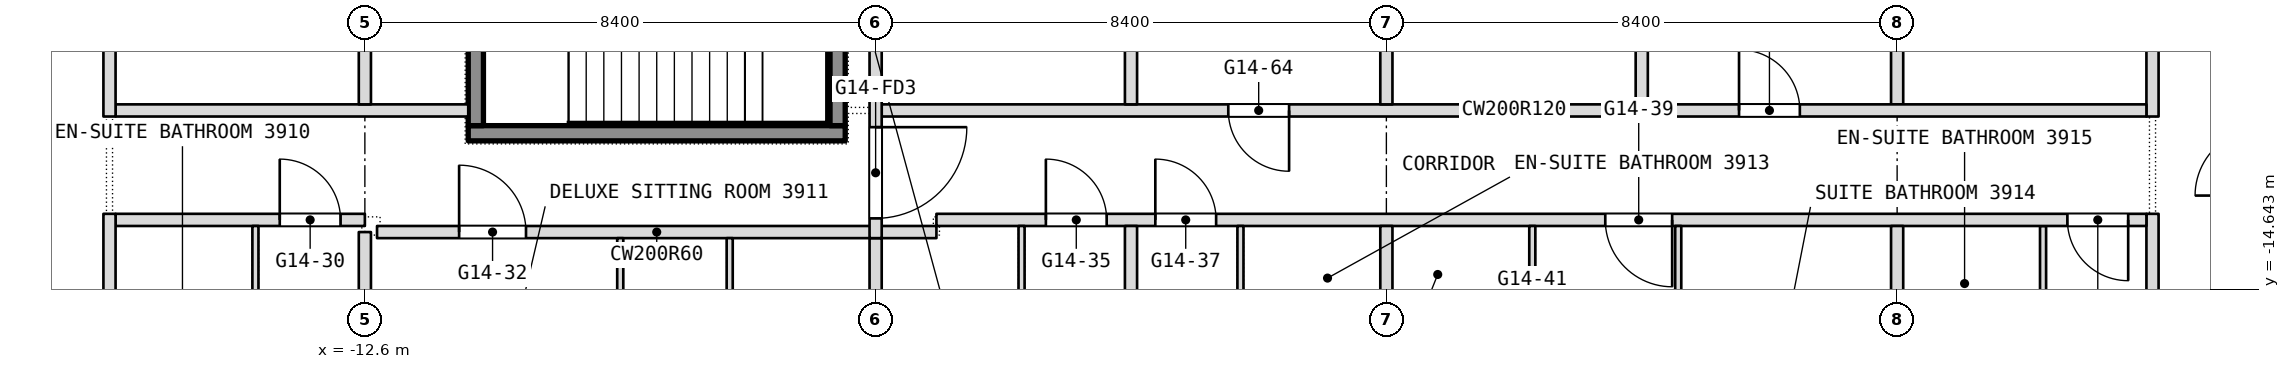
"""IFC4 building model, lengths in metres.
Left out: names, types, materials, properties, quantities, classifications, styles, units other than length and angle.
Written with IfcOpenShell. Run it as: python <this file> out.ifc"""

import sys

from ifc_helpers import new_model, si_unit, direction, frame, frame_2d, origin, place, context, subcontext, project, spatial, rectangle, extrude, element, fill, save


model = new_model("IFC4")
c1 = context("Model", 3, precision=1e-05, world=origin(), true_north=direction((0.0, 1.0)))
c2 = subcontext(c1, "Body", "Model", "MODEL_VIEW")
j1 = project(units=[si_unit("LENGTHUNIT", "METRE"), si_unit("PLANEANGLEUNIT", "RADIAN")], contexts=[c1])
p1 = place(None, origin())
s1 = spatial("IfcSite", under=j1, at=p1, CompositionType="ELEMENT")
p2 = place(p1, origin())
s2 = spatial("IfcBuilding", under=s1, at=p2, CompositionType="ELEMENT")
p3 = place(p2, frame((0.0, 0.0, 166.1)))
s3 = spatial("IfcBuildingStorey", under=s2, at=p3, CompositionType="ELEMENT", Elevation=166.1)
p4 = place(p3, frame((16.8, -22.186, 0.0), z_axis=(0.0, 0.0, 1.0), x_axis=(0.0, 1.0, 0.0)))
e1 = element("IfcWall", 1, at=p4, inside=s3, PredefinedType="PARTITIONING", context=c2, shape_type="SweptSolid", body=[
    extrude(rectangle(XDim=8.786, YDim=0.2, at=frame_2d((4.393, 0.0))), origin(), (0.0, 0.0, 1.0), 3.3),
])
p5 = place(p3, frame((16.8, -11.8, 0.0), z_axis=(0.0, 0.0, 1.0), x_axis=(0.0, 1.0, 0.0)))
e2 = element("IfcWall", 2, at=p5, inside=s3, PredefinedType="PARTITIONING", context=c2, shape_type="SweptSolid", body=[
    extrude(rectangle(XDim=9.9, YDim=0.2, at=frame_2d((4.95, 0.0))), origin(), (0.0, 0.0, 1.0), 3.3),
])
p6 = place(p3, frame((15.0, -16.45, 0.0), z_axis=(0.0, 0.0, 1.0), x_axis=(0.0, 1.0, 0.0)))
e3 = element("IfcWall", 3, at=p6, inside=s3, PredefinedType="PARTITIONING", context=c2, shape_type="SweptSolid", body=[
    extrude(rectangle(XDim=2.85, YDim=0.1, at=frame_2d((1.425, 0.0))), origin(), (0.0, 0.0, 1.0), 3.3),
])
p7 = place(p3, frame((-12.4, -13.7, 0.0), z_axis=(0.0, 0.0, 1.0), x_axis=(1.0, 0.0, 0.0)))
e4 = element("IfcWall", 4, at=p7, inside=s3, PredefinedType="PARTITIONING", context=c2, shape_type="SweptSolid", body=[
    extrude(rectangle(XDim=9.2, YDim=0.2, at=frame_2d((4.6, 0.0))), origin(), (0.0, 0.0, 1.0), 3.3),
])
p8 = place(p7, frame((1.35, 0.0, 0.0)))
e5 = element("IfcOpeningElement", 5, at=p8, cuts=e4, PredefinedType="OPENING", context=c2, shape_type="SweptSolid", body=[
    extrude(rectangle(XDim=1.1, YDim=2.1, at=frame_2d((0.55, 1.05))), frame((0.0, 0.1, 0.0), z_axis=(0.0, -1.0, 0.0), x_axis=(1.0, 0.0, 0.0)), (0.0, 0.0, 1.0), 0.2),
])
p9 = place(p3, frame((-16.7, -13.5, 0.0), z_axis=(0.0, 0.0, 1.0), x_axis=(1.0, 0.0, 0.0)))
e6 = element("IfcWall", 6, at=p9, inside=s3, PredefinedType="PARTITIONING", context=c2, shape_type="SweptSolid", body=[
    extrude(rectangle(XDim=4.1, YDim=0.2, at=frame_2d((2.05, 0.0))), origin(), (0.0, 0.0, 1.0), 3.3),
])
p10 = place(p9, frame((2.7, 0.0, 0.0)))
e7 = element("IfcOpeningElement", 7, at=p10, cuts=e6, PredefinedType="OPENING", context=c2, shape_type="SweptSolid", body=[
    extrude(rectangle(XDim=1.0, YDim=2.1, at=frame_2d((0.5, 1.05))), frame((0.0, 0.1, 0.0), z_axis=(0.0, -1.0, 0.0), x_axis=(1.0, 0.0, 0.0)), (0.0, 0.0, 1.0), 0.2),
])
p11 = place(p3, frame((-3.2, -13.5, 0.0), z_axis=(0.0, 0.0, 1.0), x_axis=(1.0, 0.0, 0.0)))
e8 = element("IfcWall", 8, at=p11, inside=s3, PredefinedType="PARTITIONING", context=c2, shape_type="SweptSolid", body=[
    extrude(rectangle(XDim=19.9, YDim=0.2, at=frame_2d((9.95, 0.0))), origin(), (0.0, 0.0, 1.0), 3.3),
])
p12 = place(p11, frame((1.8, 0.0, 0.0)))
e9 = element("IfcOpeningElement", 9, at=p12, cuts=e8, PredefinedType="OPENING", context=c2, shape_type="SweptSolid", body=[
    extrude(rectangle(XDim=1.0, YDim=2.1, at=frame_2d((0.5, 1.05))), frame((0.0, 0.1, 0.0), z_axis=(0.0, -1.0, 0.0), x_axis=(1.0, 0.0, 0.0)), (0.0, 0.0, 1.0), 0.2),
])
p13 = place(p11, frame((3.6, 0.0, 0.0)))
e10 = element("IfcOpeningElement", 10, at=p13, cuts=e8, PredefinedType="OPENING", context=c2, shape_type="SweptSolid", body=[
    extrude(rectangle(XDim=1.0, YDim=2.1, at=frame_2d((0.5, 1.05))), frame((0.0, 0.1, 0.0), z_axis=(0.0, -1.0, 0.0), x_axis=(1.0, 0.0, 0.0)), (0.0, 0.0, 1.0), 0.2),
])
p14 = place(p11, frame((11.0, 0.0, 0.0)))
e11 = element("IfcOpeningElement", 11, at=p14, cuts=e8, PredefinedType="OPENING", context=c2, shape_type="SweptSolid", body=[
    extrude(rectangle(XDim=1.1, YDim=2.1, at=frame_2d((0.55, 1.05))), frame((0.0, 0.1, 0.0), z_axis=(0.0, -1.0, 0.0), x_axis=(1.0, 0.0, 0.0)), (0.0, 0.0, 1.0), 0.2),
])
p15 = place(p11, frame((18.6, 0.0, 0.0)))
e12 = element("IfcOpeningElement", 12, at=p15, cuts=e8, PredefinedType="OPENING", context=c2, shape_type="SweptSolid", body=[
    extrude(rectangle(XDim=1.0, YDim=2.1, at=frame_2d((0.5, 1.05))), frame((0.0, 0.1, 0.0), z_axis=(0.0, -1.0, 0.0), x_axis=(1.0, 0.0, 0.0)), (0.0, 0.0, 1.0), 0.2),
])
p16 = place(p3, frame((12.6, -21.175, 0.0), z_axis=(0.0, 0.0, 1.0), x_axis=(0.0, 1.0, 0.0)))
e13 = element("IfcWall", 13, at=p16, inside=s3, PredefinedType="PARTITIONING", context=c2, shape_type="SweptSolid", body=[
    extrude(rectangle(XDim=7.575, YDim=0.2, at=frame_2d((3.788, 0.0))), origin(), (0.0, 0.0, 1.0), 2.486),
])
p17 = place(p3, frame((12.6, -11.6, 0.0), z_axis=(0.0, 0.0, 1.0), x_axis=(0.0, 1.0, 0.0)))
e14 = element("IfcWall", 14, at=p17, inside=s3, PredefinedType="PARTITIONING", context=c2, shape_type="SweptSolid", body=[
    extrude(rectangle(XDim=3.9, YDim=0.2, at=frame_2d((1.95, 0.0))), origin(), (0.0, 0.0, 1.0), 2.486),
])
p18 = place(p3, frame((-16.7, -11.7, 0.0), z_axis=(0.0, 0.0, 1.0), x_axis=(1.0, 0.0, 0.0)))
e15 = element("IfcWall", 15, at=p18, inside=s3, PredefinedType="PARTITIONING", context=c2, shape_type="SweptSolid", body=[
    extrude(rectangle(XDim=5.8, YDim=0.2, at=frame_2d((2.9, 0.0))), origin(), (0.0, 0.0, 1.0), 3.3),
])
p19 = place(p3, frame((-4.1, -11.7, 0.0), z_axis=(0.0, 0.0, 1.0), x_axis=(1.0, 0.0, 0.0)))
e16 = element("IfcWall", 16, at=p19, inside=s3, PredefinedType="PARTITIONING", context=c2, shape_type="SweptSolid", body=[
    extrude(rectangle(XDim=20.8, YDim=0.2, at=frame_2d((10.4, 0.0))), origin(), (0.0, 0.0, 1.0), 3.3),
])
p20 = place(p19, frame((14.1, 0.0, 0.0)))
e17 = element("IfcOpeningElement", 17, at=p20, cuts=e16, PredefinedType="OPENING", context=c2, shape_type="SweptSolid", body=[
    extrude(rectangle(XDim=1.0, YDim=2.1, at=frame_2d((0.5, 1.05))), frame((0.0, 0.1, 0.0), z_axis=(0.0, -1.0, 0.0), x_axis=(1.0, 0.0, 0.0)), (0.0, 0.0, 1.0), 0.2),
])
p21 = place(p19, frame((5.7, 0.0, 0.0)))
e18 = element("IfcOpeningElement", 18, at=p21, cuts=e16, PredefinedType="OPENING", context=c2, shape_type="SweptSolid", body=[
    extrude(rectangle(XDim=1.0, YDim=2.1, at=frame_2d((0.5, 1.05))), frame((0.0, 0.1, 0.0), z_axis=(0.0, -1.0, 0.0), x_axis=(1.0, 0.0, 0.0)), (0.0, 0.0, 1.0), 0.2),
])
p22 = place(p3, frame((9.0, -18.05, 0.0), z_axis=(0.0, 0.0, 1.0), x_axis=(0.0, 1.0, 0.0)))
e19 = element("IfcWall", 19, at=p22, inside=s3, PredefinedType="PARTITIONING", context=c2, shape_type="SweptSolid", body=[
    extrude(rectangle(XDim=4.45, YDim=0.1, at=frame_2d((2.225, 0.0))), origin(), (0.0, 0.0, 1.0), 3.3),
])
p23 = place(p3, frame((8.4, -11.6, 0.0), z_axis=(0.0, 0.0, 1.0), x_axis=(0.0, 1.0, 0.0)))
e20 = element("IfcWall", 20, at=p23, inside=s3, PredefinedType="PARTITIONING", context=c2, shape_type="SweptSolid", body=[
    extrude(rectangle(XDim=3.8, YDim=0.2, at=frame_2d((1.9, 0.0))), origin(), (0.0, 0.0, 1.0), 3.3),
])
p24 = place(p3, frame((6.6, -17.05, 0.0), z_axis=(0.0, 0.0, 1.0), x_axis=(0.0, 1.0, 0.0)))
e21 = element("IfcWall", 21, at=p24, inside=s3, PredefinedType="PARTITIONING", context=c2, shape_type="SweptSolid", body=[
    extrude(rectangle(XDim=3.45, YDim=0.1, at=frame_2d((1.725, 0.0))), origin(), (0.0, 0.0, 1.0), 3.3),
])
p25 = place(p24, frame((1.12, 0.0, 0.0)))
e22 = element("IfcOpeningElement", 22, at=p25, cuts=e21, PredefinedType="OPENING", context=c2, shape_type="SweptSolid", body=[
    extrude(rectangle(XDim=0.9, YDim=2.1, at=frame_2d((0.45, 1.05))), frame((0.0, 0.05, 0.0), z_axis=(0.0, -1.0, 0.0), x_axis=(1.0, 0.0, 0.0)), (0.0, 0.0, 1.0), 0.1),
])
p26 = place(p3, frame((4.2, -23.3, 0.0), z_axis=(0.0, 0.0, 1.0), x_axis=(0.0, 1.0, 0.0)))
e23 = element("IfcWall", 23, at=p26, inside=s3, PredefinedType="PARTITIONING", context=c2, shape_type="SweptSolid", body=[
    extrude(rectangle(XDim=9.7, YDim=0.2, at=frame_2d((4.85, 0.0))), origin(), (0.0, 0.0, 1.0), 2.486),
])
p27 = place(p3, frame((4.2, -11.6, 0.0), z_axis=(0.0, 0.0, 1.0), x_axis=(0.0, 1.0, 0.0)))
e24 = element("IfcWall", 24, at=p27, inside=s3, PredefinedType="PARTITIONING", context=c2, shape_type="SweptSolid", body=[
    extrude(rectangle(XDim=9.7, YDim=0.2, at=frame_2d((4.85, 0.0))), origin(), (0.0, 0.0, 1.0), 2.486),
])
p28 = place(p3, frame((1.8, -16.35, 0.0), z_axis=(0.0, 0.0, 1.0), x_axis=(0.0, 1.0, 0.0)))
e25 = element("IfcWall", 25, at=p28, inside=s3, PredefinedType="PARTITIONING", context=c2, shape_type="SweptSolid", body=[
    extrude(rectangle(XDim=2.75, YDim=0.1, at=frame_2d((1.375, 0.0))), origin(), (0.0, 0.0, 1.0), 3.3),
])
p29 = place(p3, frame((0.0, -23.3, 0.0), z_axis=(0.0, 0.0, 1.0), x_axis=(0.0, 1.0, 0.0)))
e26 = element("IfcWall", 26, at=p29, inside=s3, PredefinedType="PARTITIONING", context=c2, shape_type="SweptSolid", body=[
    extrude(rectangle(XDim=9.7, YDim=0.2, at=frame_2d((4.85, 0.0))), origin(), (0.0, 0.0, 1.0), 3.3),
])
p30 = place(p3, frame((0.0, -11.6, 0.0), z_axis=(0.0, 0.0, 1.0), x_axis=(0.0, 1.0, 0.0)))
e27 = element("IfcWall", 27, at=p30, inside=s3, PredefinedType="PARTITIONING", context=c2, shape_type="SweptSolid", body=[
    extrude(rectangle(XDim=9.7, YDim=0.2, at=frame_2d((4.85, 0.0))), origin(), (0.0, 0.0, 1.0), 3.3),
])
p31 = place(p3, frame((-1.8, -17.35, 0.0), z_axis=(0.0, 0.0, 1.0), x_axis=(0.0, 1.0, 0.0)))
e28 = element("IfcWall", 28, at=p31, inside=s3, PredefinedType="PARTITIONING", context=c2, shape_type="SweptSolid", body=[
    extrude(rectangle(XDim=3.75, YDim=0.1, at=frame_2d((1.875, 0.0))), origin(), (0.0, 0.0, 1.0), 3.3),
])
p32 = place(p3, frame((-4.2, -23.3, 0.0), z_axis=(0.0, 0.0, 1.0), x_axis=(0.0, 1.0, 0.0)))
e29 = element("IfcWall", 29, at=p32, inside=s3, PredefinedType="PARTITIONING", context=c2, shape_type="SweptSolid", body=[
    extrude(rectangle(XDim=9.5, YDim=0.2, at=frame_2d((4.75, 0.0))), origin(), (0.0, 0.0, 1.0), 2.486),
])
p33 = place(p3, frame((-4.2, -13.8, 0.0), z_axis=(0.0, 0.0, 1.0), x_axis=(0.0, 1.0, 0.0)))
e30 = element("IfcWall", 30, at=p33, inside=s3, PredefinedType="PARTITIONING", context=c2, shape_type="SweptSolid", body=[
    extrude(rectangle(XDim=13.8, YDim=0.2, at=frame_2d((6.9, 0.0))), origin(), (0.0, 0.0, 1.0), 2.486),
])
p34 = place(p33, frame((12.15, 0.0, 0.0)))
e31 = element("IfcOpeningElement", 31, at=p34, cuts=e30, PredefinedType="OPENING", context=c2, shape_type="SweptSolid", body=[
    extrude(rectangle(XDim=1.5, YDim=2.1, at=frame_2d((0.75, 1.05))), frame((0.0, 0.1, 0.0), z_axis=(0.0, -1.0, 0.0), x_axis=(1.0, 0.0, 0.0)), (0.0, 0.0, 1.0), 0.2),
])
p35 = place(p33, frame((0.325, 0.0, 0.0)))
e32 = element("IfcOpeningElement", 32, at=p35, cuts=e30, PredefinedType="OPENING", context=c2, shape_type="SweptSolid", body=[
    extrude(rectangle(XDim=1.5, YDim=2.1, at=frame_2d((0.75, 1.05))), frame((0.0, 0.1, 0.0), z_axis=(0.0, -1.0, 0.0), x_axis=(1.0, 0.0, 0.0)), (0.0, 0.0, 1.0), 0.2),
])
p36 = place(p3, frame((-6.6, -17.35, 0.0), z_axis=(0.0, 0.0, 1.0), x_axis=(0.0, 1.0, 0.0)))
e33 = element("IfcWall", 33, at=p36, inside=s3, PredefinedType="PARTITIONING", context=c2, shape_type="SweptSolid", body=[
    extrude(rectangle(XDim=3.55, YDim=0.1, at=frame_2d((1.775, 0.0))), origin(), (0.0, 0.0, 1.0), 3.3),
])
p37 = place(p3, frame((-8.4, -23.3, 0.0), z_axis=(0.0, 0.0, 1.0), x_axis=(0.0, 1.0, 0.0)))
e34 = element("IfcWall", 34, at=p37, inside=s3, PredefinedType="PARTITIONING", context=c2, shape_type="SweptSolid", body=[
    extrude(rectangle(XDim=9.5, YDim=0.1, at=frame_2d((4.75, 0.0))), origin(), (0.0, 0.0, 1.0), 3.3),
])
p38 = place(p37, frame((3.57, 0.0, 0.0)))
e35 = element("IfcOpeningElement", 35, at=p38, cuts=e34, PredefinedType="OPENING", context=c2, shape_type="SweptSolid", body=[
    extrude(rectangle(XDim=0.9, YDim=2.1, at=frame_2d((0.45, 1.05))), frame((0.0, 0.05, 0.0), z_axis=(0.0, -1.0, 0.0), x_axis=(1.0, 0.0, 0.0)), (0.0, 0.0, 1.0), 0.1),
])
p39 = place(p3, frame((-12.6, -21.175, 0.0), z_axis=(0.0, 0.0, 1.0), x_axis=(0.0, 1.0, 0.0)))
e36 = element("IfcWall", 36, at=p39, inside=s3, PredefinedType="PARTITIONING", context=c2, shape_type="SweptSolid", body=[
    extrude(rectangle(XDim=7.475, YDim=0.2, at=frame_2d((3.738, 0.0))), origin(), (0.0, 0.0, 1.0), 2.486),
])
p40 = place(p3, frame((-12.6, -11.6, 0.0), z_axis=(0.0, 0.0, 1.0), x_axis=(0.0, 1.0, 0.0)))
e37 = element("IfcWall", 37, at=p40, inside=s3, PredefinedType="PARTITIONING", context=c2, shape_type="SweptSolid", body=[
    extrude(rectangle(XDim=9.7, YDim=0.2, at=frame_2d((4.85, 0.0))), origin(), (0.0, 0.0, 1.0), 2.486),
])
p41 = place(p3, frame((-14.4, -17.65, 0.0), z_axis=(0.0, 0.0, 1.0), x_axis=(0.0, 1.0, 0.0)))
e38 = element("IfcWall", 38, at=p41, inside=s3, PredefinedType="PARTITIONING", context=c2, shape_type="SweptSolid", body=[
    extrude(rectangle(XDim=4.05, YDim=0.1, at=frame_2d((2.025, 0.0))), origin(), (0.0, 0.0, 1.0), 3.3),
])
p42 = place(p3, frame((-16.8, -22.186, 0.0), z_axis=(0.0, 0.0, 1.0), x_axis=(0.0, 1.0, 0.0)))
e39 = element("IfcWall", 39, at=p42, inside=s3, PredefinedType="PARTITIONING", context=c2, shape_type="SweptSolid", body=[
    extrude(rectangle(XDim=8.786, YDim=0.2, at=frame_2d((4.393, 0.0))), origin(), (0.0, 0.0, 1.0), 3.3),
])
p43 = place(p3, frame((-16.8, -11.8, 0.0), z_axis=(0.0, 0.0, 1.0), x_axis=(0.0, 1.0, 0.0)))
e40 = element("IfcWall", 40, at=p43, inside=s3, PredefinedType="PARTITIONING", context=c2, shape_type="SweptSolid", body=[
    extrude(rectangle(XDim=9.9, YDim=0.2, at=frame_2d((4.95, 0.0))), origin(), (0.0, 0.0, 1.0), 3.3),
])
p44 = place(p3, frame((-10.9, -12.075, 0.1), z_axis=(0.0, 0.0, 1.0), x_axis=(1.0, 0.0, 0.0)))
e41 = element("IfcWall", 41, at=p44, inside=s3, PredefinedType="SHEAR", context=c2, shape_type="SweptSolid", body=[
    extrude(rectangle(XDim=6.2, YDim=0.25, at=frame_2d((3.1, 0.0))), origin(), (0.0, 0.0, 1.0), 3.6),
])
for number, where, z_axis, x_axis in (
    (42, (-10.775, -11.95, 0.1), (0.0, 0.0, 1.0), (0.0, 1.0, 0.0)),
    (43, (-4.825, -11.95, 0.1), (0.0, 0.0, 1.0), (0.0, 1.0, 0.0)),
):
    element("IfcWall", number, at=place(p3, frame(where, z_axis=z_axis, x_axis=x_axis)), inside=s3, PredefinedType="SHEAR", context=c2, shape_type="SweptSolid", body=[
        extrude(rectangle(XDim=2.9, YDim=0.25, at=frame_2d((1.45, 0.0))), origin(), (0.0, 0.0, 1.0), 3.6),
    ])
p45 = place(p8, origin())
e44 = element("IfcDoor", 44, at=p45, inside=s3, OperationType="SINGLE_SWING_RIGHT", PredefinedType="DOOR", context=c2, shape_type="SweptSolid", body=[
    extrude(rectangle(XDim=1.1, YDim=2.1, at=frame_2d((0.55, 1.05))), frame((0.0, 0.025, 0.0), z_axis=(0.0, -1.0, 0.0), x_axis=(1.0, 0.0, 0.0)), (0.0, 0.0, 1.0), 0.05),
])
fill(e5, e44)
p46 = place(p10, origin())
e45 = element("IfcDoor", 45, at=p46, inside=s3, OperationType="SINGLE_SWING_RIGHT", PredefinedType="DOOR", context=c2, shape_type="SweptSolid", body=[
    extrude(rectangle(XDim=1.0, YDim=2.1, at=frame_2d((0.5, 1.05))), frame((0.0, 0.025, 0.0), z_axis=(0.0, -1.0, 0.0), x_axis=(1.0, 0.0, 0.0)), (0.0, 0.0, 1.0), 0.05),
])
fill(e7, e45)
p47 = place(p12, origin())
e46 = element("IfcDoor", 46, at=p47, inside=s3, OperationType="SINGLE_SWING_LEFT", PredefinedType="DOOR", context=c2, shape_type="SweptSolid", body=[
    extrude(rectangle(XDim=1.0, YDim=2.1, at=frame_2d((0.5, 1.05))), frame((0.0, 0.025, 0.0), z_axis=(0.0, -1.0, 0.0), x_axis=(1.0, 0.0, 0.0)), (0.0, 0.0, 1.0), 0.05),
])
fill(e9, e46)
p48 = place(p13, origin())
e47 = element("IfcDoor", 47, at=p48, inside=s3, OperationType="SINGLE_SWING_LEFT", PredefinedType="DOOR", context=c2, shape_type="SweptSolid", body=[
    extrude(rectangle(XDim=1.0, YDim=2.1, at=frame_2d((0.5, 1.05))), frame((0.0, 0.025, 0.0), z_axis=(0.0, -1.0, 0.0), x_axis=(1.0, 0.0, 0.0)), (0.0, 0.0, 1.0), 0.05),
])
fill(e10, e47)
p49 = place(p14, origin())
e48 = element("IfcDoor", 48, at=p49, inside=s3, OperationType="SINGLE_SWING_LEFT", PredefinedType="DOOR", context=c2, shape_type="SweptSolid", body=[
    extrude(rectangle(XDim=1.1, YDim=2.1, at=frame_2d((0.55, 1.05))), frame((0.0, 0.025, 0.0), z_axis=(0.0, -1.0, 0.0), x_axis=(1.0, 0.0, 0.0)), (0.0, 0.0, 1.0), 0.05),
])
fill(e11, e48)
p50 = place(p15, origin())
e49 = element("IfcDoor", 49, at=p50, inside=s3, OperationType="SINGLE_SWING_LEFT", PredefinedType="DOOR", context=c2, shape_type="SweptSolid", body=[
    extrude(rectangle(XDim=1.0, YDim=2.1, at=frame_2d((0.5, 1.05))), frame((0.0, 0.025, 0.0), z_axis=(0.0, -1.0, 0.0), x_axis=(1.0, 0.0, 0.0)), (0.0, 0.0, 1.0), 0.05),
])
fill(e12, e49)
p51 = place(p20, origin())
e50 = element("IfcDoor", 50, at=p51, inside=s3, OperationType="SINGLE_SWING_RIGHT", PredefinedType="DOOR", context=c2, shape_type="SweptSolid", body=[
    extrude(rectangle(XDim=1.0, YDim=2.1, at=frame_2d((0.5, 1.05))), frame((0.0, 0.025, 0.0), z_axis=(0.0, -1.0, 0.0), x_axis=(1.0, 0.0, 0.0)), (0.0, 0.0, 1.0), 0.05),
])
fill(e17, e50)
p52 = place(p21, origin())
e51 = element("IfcDoor", 51, at=p52, inside=s3, OperationType="SINGLE_SWING_RIGHT", PredefinedType="DOOR", context=c2, shape_type="SweptSolid", body=[
    extrude(rectangle(XDim=1.0, YDim=2.1, at=frame_2d((0.5, 1.05))), frame((0.0, 0.025, 0.0), z_axis=(0.0, -1.0, 0.0), x_axis=(1.0, 0.0, 0.0)), (0.0, 0.0, 1.0), 0.05),
])
fill(e18, e51)
p53 = place(p35, origin())
e52 = element("IfcDoor", 52, at=p53, inside=s3, OperationType="DOUBLE_DOOR_DOUBLE_SWING", PredefinedType="DOOR", context=c2, shape_type="SweptSolid", body=[
    extrude(rectangle(XDim=1.5, YDim=2.1, at=frame_2d((0.75, 1.05))), frame((0.0, 0.025, 0.0), z_axis=(0.0, -1.0, 0.0), x_axis=(1.0, 0.0, 0.0)), (0.0, 0.0, 1.0), 0.05),
])
fill(e32, e52)
save(model, sys.argv[1])
